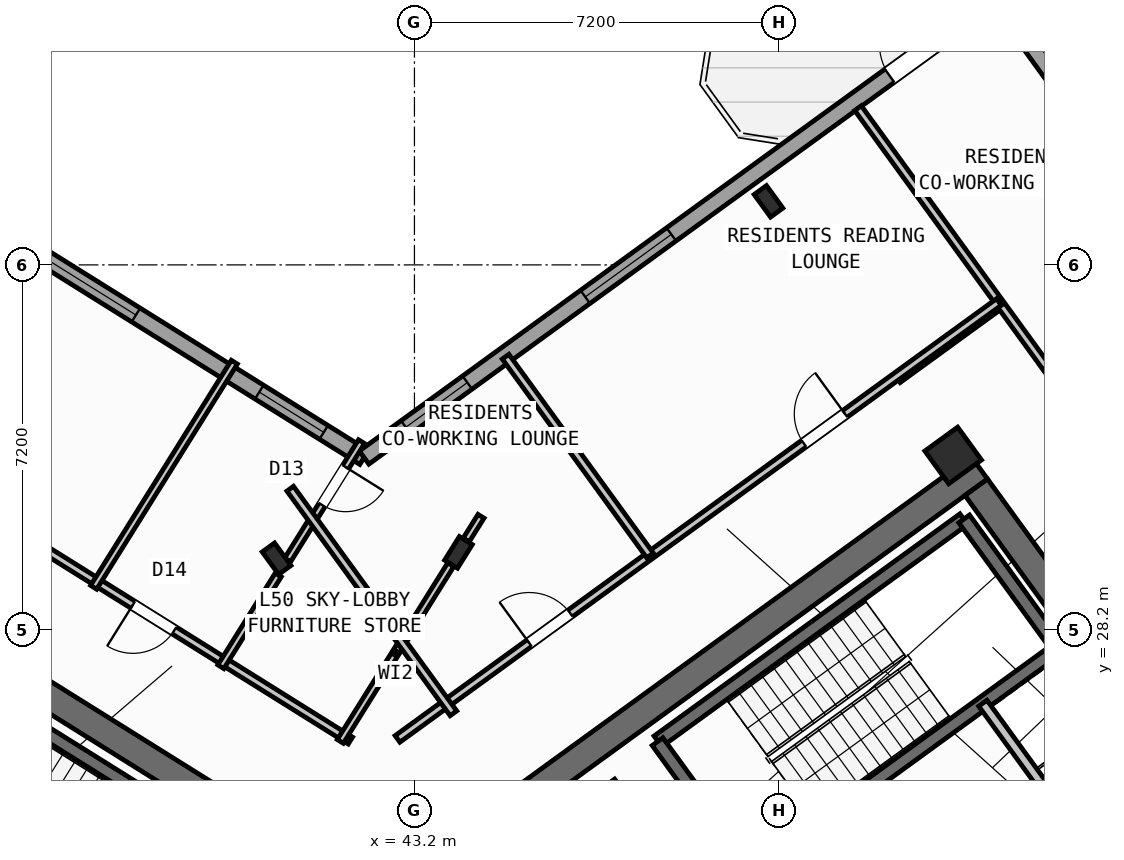
"""IFC4 building model, lengths in metres.
Left out: names, types, materials, properties, quantities, classifications, styles, units other than length and angle.
Written with IfcOpenShell. Run it as: python <this file> out.ifc"""

import sys

from ifc_helpers import new_model, si_unit, direction, frame, frame_2d, origin, origin_2d, place, context, subcontext, project, spatial, rectangle, hollow_rectangle, i_section, extrude, source, transform, mapped, element, fill, save


model = new_model("IFC4")
c1 = context("Model", 3, precision=1e-05, world=origin(), true_north=direction((0.0, 1.0)))
c2 = subcontext(c1, "Body", "Model", "MODEL_VIEW")
j1 = project(units=[si_unit("LENGTHUNIT", "METRE"), si_unit("PLANEANGLEUNIT", "RADIAN")], contexts=[c1])
p1 = place(None, origin())
s1 = spatial("IfcSite", under=j1, at=p1, CompositionType="ELEMENT")
p2 = place(p1, origin())
s2 = spatial("IfcBuilding", under=s1, at=p2, CompositionType="ELEMENT")
p3 = place(p2, frame((0.0, 0.0, 199.5)))
s3 = spatial("IfcBuildingStorey", under=s2, at=p3, CompositionType="ELEMENT", Elevation=199.5)
p4 = place(p3, frame((40.573, 24.01, 0.0), z_axis=(0.0, 0.0, 1.0), x_axis=(-0.848047359947, 0.529920442413, 0.0)))
e1 = element("IfcWall", 1, at=p4, inside=s3, PredefinedType="SHEAR", context=c2, shape_type="SweptSolid", body=[
    extrude(rectangle(XDim=13.14, YDim=0.55, at=frame_2d((6.57, 0.0))), origin(), (0.0, 0.0, 1.0), 4.25),
])
p5 = place(p3, frame((44.365, 24.142, 0.0), z_axis=(0.0, 0.0, 1.0), x_axis=(0.809024304885, 0.587775190107, 0.0)))
e2 = element("IfcWall", 2, at=p5, inside=s3, PredefinedType="SHEAR", context=c2, shape_type="SweptSolid", body=[
    extrude(rectangle(XDim=12.34, YDim=0.55, at=frame_2d((6.17, 0.0))), origin(), (0.0, 0.0, 1.0), 4.25),
])
p6 = place(p3, frame((58.064, 25.813, 0.0), z_axis=(0.0, 0.0, 1.0), x_axis=(-0.587764933797, 0.809031756236, 0.0)))
e3 = element("IfcWall", 3, at=p6, inside=s3, PredefinedType="SHEAR", context=c2, shape_type="SweptSolid", body=[
    extrude(rectangle(XDim=6.425, YDim=0.55, at=frame_2d((3.212, 0.0))), origin(), (0.0, 0.0, 1.0), 4.25),
])
m1 = source(origin(), c2, "Body", "SweptSolid", [
    extrude(i_section(OverallWidth=0.3, OverallDepth=0.55, WebThickness=0.015, FlangeThickness=0.029, at=origin_2d()), origin(), (0.0, 0.0, 1.0), 4.5),
])
for number, where, z_axis, x_axis in (
    (4, (44.068, 29.726, 0.0), (0.0, 0.0, 1.0), (-0.848, 0.53, 0.0)),
    (5, (40.479, 29.601, 0.0), (0.0, 0.0, 1.0), (0.809, 0.588, 0.0)),
):
    element("IfcColumn", number, at=place(p3, frame(where, z_axis=z_axis, x_axis=x_axis)), inside=s3, PredefinedType="COLUMN", context=c2, shape_type="MappedRepresentation", body=[
        mapped(m1, transform((0.0, 0.0, 0.0), scale=1.0)),
    ])
m2 = source(origin(), c2, "Body", "SweptSolid", [
    extrude(hollow_rectangle(XDim=0.8, YDim=0.8, WallThickness=0.032, at=origin_2d()), origin(), (0.0, 0.0, 1.0), 4.5),
])
p7 = place(p3, frame((53.832, 31.638, 0.0), z_axis=(0.0, 0.0, 1.0), x_axis=(0.809016994375, 0.587785252292, 0.0)))
e6 = element("IfcColumn", 6, at=p7, inside=s3, PredefinedType="COLUMN", context=c2, shape_type="MappedRepresentation", body=[
    mapped(m2, transform((0.0, 0.0, 0.0), scale=1.0)),
])
p8 = place(p3, frame((50.188, 36.654, 0.0), z_axis=(0.0, 0.0, 1.0), x_axis=(0.809016994375, 0.587785252292, 0.0)))
e7 = element("IfcColumn", 7, at=p8, inside=s3, PredefinedType="COLUMN", context=c2, shape_type="MappedRepresentation", body=[
    mapped(m1, transform((0.0, 0.0, 0.0), scale=1.0)),
])
p9 = place(p3, frame((17.424, 47.083, 0.0), z_axis=(0.0, 0.0, 1.0), x_axis=(0.848049927979, -0.529916332693, 0.0)))
e8 = element("IfcWall", 8, at=p9, inside=s3, PredefinedType="STANDARD", context=c2, shape_type="SweptSolid", body=[
    extrude(rectangle(XDim=29.223, YDim=0.32, at=frame_2d((14.612, 0.0))), origin(), (0.0, 0.0, 1.0), 4.25),
])
p10 = place(p9, frame((2.949, 0.0, 0.0)))
e9 = element("IfcOpeningElement", 9, at=p10, cuts=e8, PredefinedType="OPENING", context=c2, shape_type="SweptSolid", body=[
    extrude(rectangle(XDim=1.05, YDim=2.15, at=frame_2d((0.525, 1.075))), frame((0.0, 0.17, 0.0), z_axis=(0.0, -1.0, 0.0), x_axis=(1.0, 0.0, 0.0)), (0.0, 0.0, 1.0), 0.34),
])
p11 = place(p9, frame((0.789, 0.0, 0.85)))
e10 = element("IfcOpeningElement", 10, at=p11, cuts=e8, PredefinedType="OPENING", context=c2, shape_type="SweptSolid", body=[
    extrude(rectangle(XDim=1.5, YDim=1.5, at=frame_2d((0.75, 0.75))), frame((0.0, 0.17, 0.0), z_axis=(0.0, -1.0, 0.0), x_axis=(1.0, 0.0, 0.0)), (0.0, 0.0, 1.0), 0.34),
])
p12 = place(p9, frame((8.329, 0.0, 0.8)))
e11 = element("IfcOpeningElement", 11, at=p12, cuts=e8, PredefinedType="OPENING", context=c2, shape_type="SweptSolid", body=[
    extrude(rectangle(XDim=2.1, YDim=1.55, at=frame_2d((1.05, 0.775))), frame((0.0, 0.17, 0.0), z_axis=(0.0, -1.0, 0.0), x_axis=(1.0, 0.0, 0.0)), (0.0, 0.0, 1.0), 0.34),
])
p13 = place(p9, frame((13.739, 0.0, 0.85)))
e12 = element("IfcOpeningElement", 12, at=p13, cuts=e8, PredefinedType="OPENING", context=c2, shape_type="SweptSolid", body=[
    extrude(rectangle(XDim=1.5, YDim=1.5, at=frame_2d((0.75, 0.75))), frame((0.0, 0.17, 0.0), z_axis=(0.0, -1.0, 0.0), x_axis=(1.0, 0.0, 0.0)), (0.0, 0.0, 1.0), 0.34),
])
p14 = place(p9, frame((21.114, 0.0, 0.65)))
e13 = element("IfcOpeningElement", 13, at=p14, cuts=e8, PredefinedType="OPENING", context=c2, shape_type="SweptSolid", body=[
    extrude(rectangle(XDim=2.8, YDim=2.1, at=frame_2d((1.4, 1.05))), frame((0.0, 0.17, 0.0), z_axis=(0.0, -1.0, 0.0), x_axis=(1.0, 0.0, 0.0)), (0.0, 0.0, 1.0), 0.34),
])
p15 = place(p9, frame((26.784, 0.0, 0.85)))
e14 = element("IfcOpeningElement", 14, at=p15, cuts=e8, PredefinedType="OPENING", context=c2, shape_type="SweptSolid", body=[
    extrude(rectangle(XDim=1.5, YDim=1.5, at=frame_2d((0.75, 0.75))), frame((0.0, 0.17, 0.0), z_axis=(0.0, -1.0, 0.0), x_axis=(1.0, 0.0, 0.0)), (0.0, 0.0, 1.0), 0.34),
])
p16 = place(p3, frame((42.207, 31.597, 0.0), z_axis=(0.0, 0.0, 1.0), x_axis=(0.809020333377, 0.587780656523, 0.0)))
e15 = element("IfcWall", 15, at=p16, inside=s3, PredefinedType="STANDARD", context=c2, shape_type="SweptSolid", body=[
    extrude(rectangle(XDim=15.223, YDim=0.32, at=frame_2d((7.611, 0.0))), origin(), (0.0, 0.0, 1.0), 4.25),
])
p17 = place(p16, frame((12.82, 0.0, 0.0)))
e16 = element("IfcOpeningElement", 16, at=p17, cuts=e15, PredefinedType="OPENING", context=c2, shape_type="SweptSolid", body=[
    extrude(rectangle(XDim=1.05, YDim=2.15, at=frame_2d((0.525, 1.075))), frame((0.0, 0.17, 0.0), z_axis=(0.0, -1.0, 0.0), x_axis=(1.0, 0.0, 0.0)), (0.0, 0.0, 1.0), 0.34),
])
p18 = place(p16, frame((1.018, 0.0, 0.85)))
e17 = element("IfcOpeningElement", 17, at=p18, cuts=e15, PredefinedType="OPENING", context=c2, shape_type="SweptSolid", body=[
    extrude(rectangle(XDim=1.5, YDim=1.5, at=frame_2d((0.75, 0.75))), frame((0.0, 0.17, 0.0), z_axis=(0.0, -1.0, 0.0), x_axis=(1.0, 0.0, 0.0)), (0.0, 0.0, 1.0), 0.34),
])
p19 = place(p16, frame((5.394, 0.0, 0.8)))
e18 = element("IfcOpeningElement", 18, at=p19, cuts=e15, PredefinedType="OPENING", context=c2, shape_type="SweptSolid", body=[
    extrude(rectangle(XDim=2.1, YDim=1.55, at=frame_2d((1.05, 0.775))), frame((0.0, 0.17, 0.0), z_axis=(0.0, -1.0, 0.0), x_axis=(1.0, 0.0, 0.0)), (0.0, 0.0, 1.0), 0.34),
])
p20 = place(p3, frame((54.81, 40.5, 0.0), z_axis=(0.0, 0.0, 1.0), x_axis=(0.587783625747, -0.809018176127, 0.0)))
e19 = element("IfcWall", 19, at=p20, inside=s3, PredefinedType="STANDARD", context=c2, shape_type="SweptSolid", body=[
    extrude(rectangle(XDim=21.587, YDim=0.32, at=frame_2d((10.794, 0.0))), origin(), (0.0, 0.0, 1.0), 3.725),
])
p21 = place(p20, frame((2.018, 0.0, 0.65)))
e20 = element("IfcOpeningElement", 20, at=p21, cuts=e19, PredefinedType="OPENING", context=c2, shape_type="SweptSolid", body=[
    extrude(rectangle(XDim=2.8, YDim=2.1, at=frame_2d((1.4, 1.05))), frame((0.0, 0.17, 0.0), z_axis=(0.0, -1.0, 0.0), x_axis=(1.0, 0.0, 0.0)), (0.0, 0.0, 1.0), 0.34),
])
p22 = place(p20, frame((9.194, 0.0, 0.8)))
e21 = element("IfcOpeningElement", 21, at=p22, cuts=e19, PredefinedType="OPENING", context=c2, shape_type="SweptSolid", body=[
    extrude(rectangle(XDim=2.1, YDim=1.55, at=frame_2d((1.05, 0.775))), frame((0.0, 0.17, 0.0), z_axis=(0.0, -1.0, 0.0), x_axis=(1.0, 0.0, 0.0)), (0.0, 0.0, 1.0), 0.34),
])
p23 = place(p3, frame((39.721, 23.788, 0.0), z_axis=(0.0, 0.0, 1.0), x_axis=(-0.848054434086, 0.529909121291, 0.0)))
e22 = element("IfcWall", 22, at=p23, inside=s3, PredefinedType="SHEAR", context=c2, shape_type="SweptSolid", body=[
    extrude(rectangle(XDim=7.33, YDim=0.26, at=frame_2d((3.665, 0.0))), origin(), (0.0, 0.0, 1.0), 4.25),
])
p24 = place(p3, frame((48.006, 25.996, 0.0), z_axis=(0.0, 0.0, 1.0), x_axis=(0.80901903764, 0.587782439969, 0.0)))
e23 = element("IfcWall", 23, at=p24, inside=s3, PredefinedType="SHEAR", context=c2, shape_type="SweptSolid", body=[
    extrude(rectangle(XDim=7.46, YDim=0.26, at=frame_2d((3.73, 0.0))), origin(), (0.0, 0.0, 1.0), 4.25),
])
p25 = place(p3, frame((49.863, 23.44, 0.0), z_axis=(0.0, 0.0, 1.0), x_axis=(0.809003474932, 0.587803859759, 0.0)))
e24 = element("IfcWall", 24, at=p25, inside=s3, PredefinedType="SHEAR", context=c2, shape_type="SweptSolid", body=[
    extrude(rectangle(XDim=7.46, YDim=0.26, at=frame_2d((3.73, 0.0))), origin(), (0.0, 0.0, 1.0), 4.25),
])
p26 = place(p25, frame((0.36, 0.0, 0.0)))
e25 = element("IfcOpeningElement", 25, at=p26, cuts=e24, PredefinedType="OPENING", context=c2, shape_type="SweptSolid", body=[
    extrude(rectangle(XDim=0.86, YDim=2.05, at=frame_2d((0.43, 1.025))), frame((0.0, 0.14, 0.0), z_axis=(0.0, -1.0, 0.0), x_axis=(1.0, 0.0, 0.0)), (0.0, 0.0, 1.0), 0.28),
])
p27 = place(p3, frame((49.855, 23.434, 0.0), z_axis=(0.0, 0.0, 1.0), x_axis=(-0.58776738483, 0.809029975545, 0.0)))
e26 = element("IfcWall", 26, at=p27, inside=s3, PredefinedType="SHEAR", context=c2, shape_type="SweptSolid", body=[
    extrude(rectangle(XDim=3.16, YDim=0.26, at=frame_2d((1.58, 0.0))), origin(), (0.0, 0.0, 1.0), 4.25),
])
p28 = place(p3, frame((55.906, 27.831, 0.0), z_axis=(0.0, 0.0, 1.0), x_axis=(-0.587804123638, 0.809003283204, 0.0)))
e27 = element("IfcWall", 27, at=p28, inside=s3, PredefinedType="SHEAR", context=c2, shape_type="SweptSolid", body=[
    extrude(rectangle(XDim=3.16, YDim=0.26, at=frame_2d((1.58, 0.0))), origin(), (0.0, 0.0, 1.0), 4.25),
])
p29 = place(p3, frame((48.786, 22.83, 0.0), z_axis=(0.0, 0.0, 1.0), x_axis=(-0.587783856777, 0.809018008275, 0.0)))
e28 = element("IfcWall", 28, at=p29, inside=s3, PredefinedType="STANDARD", context=c2, shape_type="SweptSolid", body=[
    extrude(rectangle(XDim=2.92, YDim=0.2, at=frame_2d((1.46, 0.0))), origin(), (0.0, 0.0, 1.0), 4.24),
])
p30 = place(p3, frame((56.111, 24.419, 0.0), z_axis=(0.0, 0.0, 1.0), x_axis=(-0.58777848983, 0.809021907548, 0.0)))
e29 = element("IfcWall", 29, at=p30, inside=s3, PredefinedType="STANDARD", context=c2, shape_type="SweptSolid", body=[
    extrude(rectangle(XDim=2.88, YDim=0.2, at=frame_2d((1.44, 0.0))), origin(), (0.0, 0.0, 1.0), 4.24),
])
p31 = place(p3, frame((53.425, 22.468, 0.0), z_axis=(0.0, 0.0, 1.0), x_axis=(0.809024377198, 0.587775090574, 0.0)))
e30 = element("IfcWall", 30, at=p31, inside=s3, PredefinedType="STANDARD", context=c2, shape_type="SweptSolid", body=[
    extrude(rectangle(XDim=5.418, YDim=0.2, at=frame_2d((2.709, 0.0))), origin(), (0.0, 0.0, 1.0), 4.24),
])
p32 = place(p31, frame((4.28, 0.0, 0.0)))
e31 = element("IfcOpeningElement", 31, at=p32, cuts=e30, PredefinedType="OPENING", context=c2, shape_type="SweptSolid", body=[
    extrude(rectangle(XDim=0.86, YDim=2.05, at=frame_2d((0.43, 1.025))), frame((0.0, 0.11, 0.0), z_axis=(0.0, -1.0, 0.0), x_axis=(1.0, 0.0, 0.0)), (0.0, 0.0, 1.0), 0.22),
])
p33 = place(p31, frame((1.45, 0.0, 0.0)))
e32 = element("IfcOpeningElement", 32, at=p33, cuts=e30, PredefinedType="OPENING", context=c2, shape_type="SweptSolid", body=[
    extrude(rectangle(XDim=0.86, YDim=2.05, at=frame_2d((0.43, 1.025))), frame((0.0, 0.11, 0.0), z_axis=(0.0, -1.0, 0.0), x_axis=(1.0, 0.0, 0.0)), (0.0, 0.0, 1.0), 0.22),
])
p34 = place(p3, frame((41.936, 26.012, 0.0), z_axis=(0.0, 0.0, 1.0), x_axis=(-0.848051154596, 0.529914369676, 0.0)))
e33 = element("IfcWall", 33, at=p34, inside=s3, PredefinedType="PARTITIONING", context=c2, shape_type="SweptSolid", body=[
    extrude(rectangle(XDim=15.57, YDim=0.16, at=frame_2d((7.785, 0.0))), origin(), (0.0, 0.0, 1.0), 4.24),
])
p35 = place(p34, frame((4.1, 0.0, 0.0)))
e34 = element("IfcOpeningElement", 34, at=p35, cuts=e33, PredefinedType="OPENING", context=c2, shape_type="SweptSolid", body=[
    extrude(rectangle(XDim=0.96, YDim=2.08, at=frame_2d((0.48, 1.04))), frame((0.0, 0.09, 0.0), z_axis=(0.0, -1.0, 0.0), x_axis=(1.0, 0.0, 0.0)), (0.0, 0.0, 1.0), 0.18),
])
p36 = place(p34, frame((8.2, 0.0, 0.0)))
e35 = element("IfcOpeningElement", 35, at=p36, cuts=e33, PredefinedType="OPENING", context=c2, shape_type="SweptSolid", body=[
    extrude(rectangle(XDim=1.7, YDim=2.2, at=frame_2d((0.85, 1.1))), frame((0.0, 0.09, 0.0), z_axis=(0.0, -1.0, 0.0), x_axis=(1.0, 0.0, 0.0)), (0.0, 0.0, 1.0), 0.18),
])
p37 = place(p3, frame((42.156, 31.912, 0.0), z_axis=(0.0, 0.0, 1.0), x_axis=(-0.529943141103, -0.848033175765, 0.0)))
e36 = element("IfcWall", 36, at=p37, inside=s3, PredefinedType="PLUMBINGWALL", context=c2, shape_type="SweptSolid", body=[
    extrude(rectangle(XDim=2.753, YDim=0.14, at=frame_2d((1.376, 0.0))), origin(), (0.0, 0.0, 1.0), 3.835),
])
p38 = place(p37, frame((0.593, 0.0, 0.0)))
e37 = element("IfcOpeningElement", 37, at=p38, cuts=e36, PredefinedType="OPENING", context=c2, shape_type="SweptSolid", body=[
    extrude(rectangle(XDim=0.88, YDim=2.08, at=frame_2d((0.44, 1.04))), frame((0.0, 0.08, 0.0), z_axis=(0.0, -1.0, 0.0), x_axis=(1.0, 0.0, 0.0)), (0.0, 0.0, 1.0), 0.16),
])
p39 = place(p3, frame((40.512, 29.281, 0.0), z_axis=(0.0, 0.0, 1.0), x_axis=(-0.529947607416, -0.848030384712, 0.0)))
e38 = element("IfcWall", 38, at=p39, inside=s3, PredefinedType="PLUMBINGWALL", context=c2, shape_type="SweptSolid", body=[
    extrude(rectangle(XDim=2.138, YDim=0.14, at=frame_2d((1.069, 0.0))), origin(), (0.0, 0.0, 1.0), 4.24),
])
p40 = place(p3, frame((44.514, 30.439, 0.0), z_axis=(0.0, 0.0, 1.0), x_axis=(-0.530117963224, -0.847923902875, 0.0)))
e39 = element("IfcWall", 39, at=p40, inside=s3, PredefinedType="PLUMBINGWALL", context=c2, shape_type="SweptSolid", body=[
    extrude(rectangle(XDim=0.553, YDim=0.14, at=frame_2d((0.277, 0.0))), origin(), (0.0, 0.0, 1.0), 4.24),
])
p41 = place(p3, frame((43.916, 29.483, 0.0), z_axis=(0.0, 0.0, 1.0), x_axis=(-0.529897559092, -0.848061658648, 0.0)))
e40 = element("IfcWall", 40, at=p41, inside=s3, PredefinedType="PLUMBINGWALL", context=c2, shape_type="SweptSolid", body=[
    extrude(rectangle(XDim=4.113, YDim=0.14, at=frame_2d((2.057, 0.0))), origin(), (0.0, 0.0, 1.0), 3.725),
])
p42 = place(p3, frame((39.646, 33.48, 0.0), z_axis=(0.0, 0.0, 1.0), x_axis=(-0.529923555071, -0.848045414928, 0.0)))
e41 = element("IfcWall", 41, at=p42, inside=s3, PredefinedType="PLUMBINGWALL", context=c2, shape_type="SweptSolid", body=[
    extrude(rectangle(XDim=5.24, YDim=0.14, at=frame_2d((2.62, 0.0))), origin(), (0.0, 0.0, 1.0), 4.24),
])
p43 = place(p3, frame((52.739, 33.143, 0.0), z_axis=(0.0, 0.0, 1.0), x_axis=(0.809000999347, 0.58780726693, 0.0)))
e42 = element("IfcWall", 42, at=p43, inside=s3, PredefinedType="PARTITIONING", context=c2, shape_type="SweptSolid", body=[
    extrude(rectangle(XDim=2.51, YDim=0.16, at=frame_2d((1.255, 0.0))), origin(), (0.0, 0.0, 1.0), 4.24),
])
p44 = place(p3, frame((61.564, 25.266, 0.0), z_axis=(0.0, 0.0, 1.0), x_axis=(-0.587784527444, 0.809017521007, 0.0)))
e43 = element("IfcWall", 43, at=p44, inside=s3, PredefinedType="PARTITIONING", context=c2, shape_type="SweptSolid", body=[
    extrude(rectangle(XDim=16.35, YDim=0.16, at=frame_2d((8.175, 0.0))), origin(), (0.0, 0.0, 1.0), 4.24),
])
p45 = place(p3, frame((42.866, 26.044, 0.0), z_axis=(0.0, 0.0, 1.0), x_axis=(0.809020254154, 0.587780765566, 0.0)))
e44 = element("IfcWall", 44, at=p45, inside=s3, PredefinedType="PARTITIONING", context=c2, shape_type="SweptSolid", body=[
    extrude(rectangle(XDim=14.67, YDim=0.16, at=frame_2d((7.335, 0.0))), origin(), (0.0, 0.0, 1.0), 4.24),
])
p46 = place(p45, frame((3.215, 0.0, 0.0)))
e45 = element("IfcOpeningElement", 45, at=p46, cuts=e44, PredefinedType="OPENING", context=c2, shape_type="SweptSolid", body=[
    extrude(rectangle(XDim=1.0, YDim=2.1, at=frame_2d((0.5, 1.05))), frame((0.0, 0.09, 0.0), z_axis=(0.0, -1.0, 0.0), x_axis=(1.0, 0.0, 0.0)), (0.0, 0.0, 1.0), 0.18),
])
p47 = place(p45, frame((9.915, 0.0, 0.0)))
e46 = element("IfcOpeningElement", 46, at=p47, cuts=e44, PredefinedType="OPENING", context=c2, shape_type="SweptSolid", body=[
    extrude(rectangle(XDim=1.0, YDim=2.1, at=frame_2d((0.5, 1.05))), frame((0.0, 0.09, 0.0), z_axis=(0.0, -1.0, 0.0), x_axis=(1.0, 0.0, 0.0)), (0.0, 0.0, 1.0), 0.18),
])
p48 = place(p3, frame((43.969, 26.55, 0.0), z_axis=(0.0, 0.0, 1.0), x_axis=(-0.587776919386, 0.80902304852, 0.0)))
e47 = element("IfcWall", 47, at=p48, inside=s3, PredefinedType="PARTITIONING", context=c2, shape_type="SweptSolid", body=[
    extrude(rectangle(XDim=5.48, YDim=0.16, at=frame_2d((2.74, 0.0))), origin(), (0.0, 0.0, 1.0), 4.24),
])
p49 = place(p3, frame((47.849, 29.665, 0.0), z_axis=(0.0, 0.0, 1.0), x_axis=(-0.587785532001, 0.809016791155, 0.0)))
e48 = element("IfcWall", 48, at=p49, inside=s3, PredefinedType="PARTITIONING", context=c2, shape_type="SweptSolid", body=[
    extrude(rectangle(XDim=4.85, YDim=0.16, at=frame_2d((2.425, 0.0))), origin(), (0.0, 0.0, 1.0), 4.24),
])
m3 = source(origin(), c2, "Body", "SweptSolid", [
    extrude(rectangle(XDim=1.05, YDim=2.15, at=frame_2d((0.525, 1.075))), frame((0.0, 0.025, 0.0), z_axis=(0.0, -1.0, 0.0), x_axis=(1.0, 0.0, 0.0)), (0.0, 0.0, 1.0), 0.05),
])
p50 = place(p17, origin())
e49 = element("IfcDoor", 49, at=p50, inside=s3, OperationType="SINGLE_SWING_RIGHT", PredefinedType="DOOR", context=c2, shape_type="MappedRepresentation", body=[
    mapped(m3, transform((0.0, 0.0, 0.0), scale=1.0)),
])
fill(e16, e49)
m4 = source(origin(), c2, "Body", "SweptSolid", [
    extrude(rectangle(XDim=2.8, YDim=2.1, at=frame_2d((1.4, 1.05))), frame((0.0, 0.03, 0.0), z_axis=(0.0, -1.0, 0.0), x_axis=(1.0, 0.0, 0.0)), (0.0, 0.0, 1.0), 0.06),
])
p51 = place(p14, origin())
e50 = element("IfcWindow", 50, at=p51, inside=s3, PartitioningType="SINGLE_PANEL", PredefinedType="WINDOW", context=c2, shape_type="MappedRepresentation", body=[
    mapped(m4, transform((0.0, 0.0, 0.0), scale=1.0)),
])
fill(e13, e50)
m5 = source(origin(), c2, "Body", "SweptSolid", [
    extrude(rectangle(XDim=1.5, YDim=1.5, at=frame_2d((0.75, 0.75))), frame((0.0, 0.03, 0.0), z_axis=(0.0, -1.0, 0.0), x_axis=(1.0, 0.0, 0.0)), (0.0, 0.0, 1.0), 0.06),
])
p52 = place(p15, origin())
e51 = element("IfcWindow", 51, at=p52, inside=s3, PartitioningType="SINGLE_PANEL", PredefinedType="WINDOW", context=c2, shape_type="MappedRepresentation", body=[
    mapped(m5, transform((0.0, 0.0, 0.0), scale=1.0)),
])
fill(e14, e51)
p53 = place(p18, origin())
e52 = element("IfcWindow", 52, at=p53, inside=s3, PartitioningType="SINGLE_PANEL", PredefinedType="WINDOW", context=c2, shape_type="MappedRepresentation", body=[
    mapped(m5, transform((0.0, 0.0, 0.0), scale=1.0)),
])
fill(e17, e52)
m6 = source(origin(), c2, "Body", "SweptSolid", [
    extrude(rectangle(XDim=2.1, YDim=1.55, at=frame_2d((1.05, 0.775))), frame((0.0, 0.03, 0.0), z_axis=(0.0, -1.0, 0.0), x_axis=(1.0, 0.0, 0.0)), (0.0, 0.0, 1.0), 0.06),
])
p54 = place(p19, origin())
e53 = element("IfcWindow", 53, at=p54, inside=s3, PartitioningType="SINGLE_PANEL", PredefinedType="WINDOW", context=c2, shape_type="MappedRepresentation", body=[
    mapped(m6, transform((0.0, 0.0, 0.0), scale=1.0)),
])
fill(e18, e53)
m7 = source(origin(), c2, "Body", "SweptSolid", [
    extrude(rectangle(XDim=0.88, YDim=2.08, at=frame_2d((0.44, 1.04))), frame((0.0, 0.025, 0.0), z_axis=(0.0, -1.0, 0.0), x_axis=(1.0, 0.0, 0.0)), (0.0, 0.0, 1.0), 0.05),
])
p55 = place(p38, origin())
e54 = element("IfcDoor", 54, at=p55, inside=s3, OperationType="SINGLE_SWING_LEFT", PredefinedType="DOOR", context=c2, shape_type="MappedRepresentation", body=[
    mapped(m7, transform((0.0, 0.0, 0.0), scale=1.0)),
])
fill(e37, e54)
m8 = source(origin(), c2, "Body", "SweptSolid", [
    extrude(rectangle(XDim=0.96, YDim=2.08, at=frame_2d((0.48, 1.04))), frame((0.0, 0.025, 0.0), z_axis=(0.0, -1.0, 0.0), x_axis=(1.0, 0.0, 0.0)), (0.0, 0.0, 1.0), 0.05),
])
p56 = place(p35, origin())
e55 = element("IfcDoor", 55, at=p56, inside=s3, OperationType="SINGLE_SWING_RIGHT", PredefinedType="DOOR", context=c2, shape_type="MappedRepresentation", body=[
    mapped(m8, transform((0.0, 0.0, 0.0), scale=1.0)),
])
fill(e34, e55)
m9 = source(origin(), c2, "Body", "SweptSolid", [
    extrude(rectangle(XDim=1.0, YDim=2.1, at=frame_2d((0.5, 1.05))), frame((0.0, 0.025, 0.0), z_axis=(0.0, -1.0, 0.0), x_axis=(1.0, 0.0, 0.0)), (0.0, 0.0, 1.0), 0.05),
])
p57 = place(p46, origin())
e56 = element("IfcDoor", 56, at=p57, inside=s3, OperationType="SINGLE_SWING_LEFT", PredefinedType="DOOR", context=c2, shape_type="MappedRepresentation", body=[
    mapped(m9, transform((0.0, 0.0, 0.0), scale=1.0)),
])
fill(e45, e56)
p58 = place(p47, origin())
e57 = element("IfcDoor", 57, at=p58, inside=s3, OperationType="SINGLE_SWING_RIGHT", PredefinedType="DOOR", context=c2, shape_type="MappedRepresentation", body=[
    mapped(m9, transform((0.0, 0.0, 0.0), scale=1.0)),
])
fill(e46, e57)
save(model, sys.argv[1])
